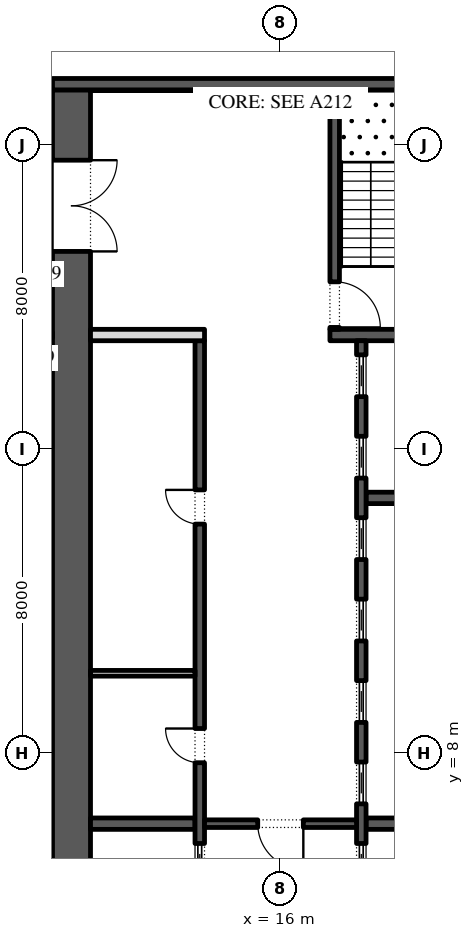
"""IFC4 building model, lengths in metres.
Left out: names, types, materials, properties, quantities, classifications, styles, units other than length and angle.
Written with IfcOpenShell. Run it as: python <this file> out.ifc"""

import sys

from ifc_helpers import new_model, si_unit, direction, frame, frame_2d, origin, place, context, subcontext, project, spatial, rectangle, extrude, element, fill, save


model = new_model("IFC4")
c1 = context("Model", 3, precision=1e-05, world=origin(), true_north=direction((0.0, 1.0)))
c2 = subcontext(c1, "Body", "Model", "MODEL_VIEW")
j1 = project(units=[si_unit("LENGTHUNIT", "METRE"), si_unit("PLANEANGLEUNIT", "RADIAN")], contexts=[c1])
p1 = place(None, origin())
s1 = spatial("IfcSite", under=j1, at=p1, CompositionType="ELEMENT")
p2 = place(p1, origin())
s2 = spatial("IfcBuilding", under=s1, at=p2, CompositionType="ELEMENT")
p3 = place(p2, frame((0.0, 0.0, 48.0)))
s3 = spatial("IfcBuildingStorey", under=s2, at=p3, CompositionType="ELEMENT", Elevation=48.0)
p4 = place(p3, frame((10.5, -2.45, 0.0), z_axis=(0.0, 0.0, 1.0), x_axis=(0.0, 1.0, 0.0)))
e1 = element("IfcWall", 1, at=p4, inside=s3, PredefinedType="SHEAR", context=c2, shape_type="SweptSolid", body=[
    extrude(rectangle(XDim=27.9, YDim=1.0, at=frame_2d((13.95, 0.0))), origin(), (0.0, 0.0, 1.0), 4.0),
])
p5 = place(p4, frame((23.65, 0.0, 0.0)))
e2 = element("IfcOpeningElement", 2, at=p5, cuts=e1, PredefinedType="OPENING", context=c2, shape_type="SweptSolid", body=[
    extrude(rectangle(XDim=2.4, YDim=2.1, at=frame_2d((1.2, 1.05))), frame((0.0, 0.51, 0.0), z_axis=(0.0, -1.0, 0.0), x_axis=(1.0, 0.0, 0.0)), (0.0, 0.0, 1.0), 1.02),
])
p6 = place(p4, frame((2.7, 0.0, 0.0)))
e3 = element("IfcOpeningElement", 3, at=p6, cuts=e1, PredefinedType="OPENING", context=c2, shape_type="SweptSolid", body=[
    extrude(rectangle(XDim=0.9, YDim=2.1, at=frame_2d((0.45, 1.05))), frame((0.0, 0.51, 0.0), z_axis=(0.0, -1.0, 0.0), x_axis=(1.0, 0.0, 0.0)), (0.0, 0.0, 1.0), 1.02),
])
p7 = place(p3, frame((10.0, 25.6, 0.0), z_axis=(0.0, 0.0, 1.0), x_axis=(1.0, 0.0, 0.0)))
e4 = element("IfcWall", 4, at=p7, inside=s3, PredefinedType="SHEAR", context=c2, shape_type="SweptSolid", body=[
    extrude(rectangle(XDim=12.0, YDim=0.3, at=frame_2d((6.0, 0.0))), origin(), (0.0, 0.0, 1.0), 4.0),
])
p8 = place(p3, frame((17.3, 19.0, 0.0), z_axis=(0.0, 0.0, 1.0), x_axis=(1.0, 0.0, 0.0)))
e5 = element("IfcWall", 5, at=p8, inside=s3, PredefinedType="SHEAR", context=c2, shape_type="SweptSolid", body=[
    extrude(rectangle(XDim=3.7, YDim=0.3, at=frame_2d((1.85, 0.0))), origin(), (0.0, 0.0, 1.0), 4.0),
])
p9 = place(p3, frame((17.425, 19.15, 0.0), z_axis=(0.0, 0.0, 1.0), x_axis=(0.0, 1.0, 0.0)))
e6 = element("IfcWall", 6, at=p9, inside=s3, PredefinedType="SHEAR", context=c2, shape_type="SweptSolid", body=[
    extrude(rectangle(XDim=6.3, YDim=0.25, at=frame_2d((3.15, 0.0))), origin(), (0.0, 0.0, 1.0), 4.0),
])
p10 = place(p9, frame((0.05, 0.0, 0.0)))
e7 = element("IfcOpeningElement", 7, at=p10, cuts=e6, PredefinedType="OPENING", context=c2, shape_type="SweptSolid", body=[
    extrude(rectangle(XDim=1.2, YDim=2.1, at=frame_2d((0.6, 1.05))), frame((0.0, 0.135, 0.0), z_axis=(0.0, -1.0, 0.0), x_axis=(1.0, 0.0, 0.0)), (0.0, 0.0, 1.0), 0.27),
])
for number, where, z_axis, x_axis in (
    (8, (18.25, 6.143, 0.0), (0.0, 0.0, 1.0), (1.0, 0.0, 0.0)),
    (9, (18.25, 14.714, 0.0), (0.0, 0.0, 1.0), (1.0, 0.0, 0.0)),
):
    element("IfcWall", number, at=place(p3, frame(where, z_axis=z_axis, x_axis=x_axis)), inside=s3, PredefinedType="SHEAR", context=c2, shape_type="SweptSolid", body=[
        extrude(rectangle(XDim=2.75, YDim=0.3, at=frame_2d((1.375, 0.0))), origin(), (0.0, 0.0, 1.0), 4.0),
    ])
p11 = place(p3, frame((18.125, 4.15, 0.0), z_axis=(0.0, 0.0, 1.0), x_axis=(0.0, 1.0, 0.0)))
e10 = element("IfcWall", 10, at=p11, inside=s3, PredefinedType="SHEAR", context=c2, shape_type="SweptSolid", body=[
    extrude(rectangle(XDim=14.7, YDim=0.25, at=frame_2d((7.35, 0.0))), origin(), (0.0, 0.0, 1.0), 4.0),
])
p12 = place(p11, frame((0.371, 0.0, 0.0)))
e11 = element("IfcOpeningElement", 11, at=p12, cuts=e10, PredefinedType="OPENING", context=c2, shape_type="SweptSolid", body=[
    extrude(rectangle(XDim=1.1, YDim=2.1, at=frame_2d((0.55, 1.05))), frame((0.0, 0.135, 0.0), z_axis=(0.0, -1.0, 0.0), x_axis=(1.0, 0.0, 0.0)), (0.0, 0.0, 1.0), 0.27),
])
p13 = place(p11, frame((2.514, 0.0, 0.0)))
e12 = element("IfcOpeningElement", 12, at=p13, cuts=e10, PredefinedType="OPENING", context=c2, shape_type="SweptSolid", body=[
    extrude(rectangle(XDim=1.1, YDim=2.1, at=frame_2d((0.55, 1.05))), frame((0.0, 0.135, 0.0), z_axis=(0.0, -1.0, 0.0), x_axis=(1.0, 0.0, 0.0)), (0.0, 0.0, 1.0), 0.27),
])
p14 = place(p11, frame((4.657, 0.0, 0.0)))
e13 = element("IfcOpeningElement", 13, at=p14, cuts=e10, PredefinedType="OPENING", context=c2, shape_type="SweptSolid", body=[
    extrude(rectangle(XDim=1.1, YDim=2.1, at=frame_2d((0.55, 1.05))), frame((0.0, 0.135, 0.0), z_axis=(0.0, -1.0, 0.0), x_axis=(1.0, 0.0, 0.0)), (0.0, 0.0, 1.0), 0.27),
])
p15 = place(p11, frame((6.8, 0.0, 0.0)))
e14 = element("IfcOpeningElement", 14, at=p15, cuts=e10, PredefinedType="OPENING", context=c2, shape_type="SweptSolid", body=[
    extrude(rectangle(XDim=1.1, YDim=2.1, at=frame_2d((0.55, 1.05))), frame((0.0, 0.135, 0.0), z_axis=(0.0, -1.0, 0.0), x_axis=(1.0, 0.0, 0.0)), (0.0, 0.0, 1.0), 0.27),
])
p16 = place(p11, frame((8.943, 0.0, 0.0)))
e15 = element("IfcOpeningElement", 15, at=p16, cuts=e10, PredefinedType="OPENING", context=c2, shape_type="SweptSolid", body=[
    extrude(rectangle(XDim=1.1, YDim=2.1, at=frame_2d((0.55, 1.05))), frame((0.0, 0.135, 0.0), z_axis=(0.0, -1.0, 0.0), x_axis=(1.0, 0.0, 0.0)), (0.0, 0.0, 1.0), 0.27),
])
p17 = place(p11, frame((11.086, 0.0, 0.0)))
e16 = element("IfcOpeningElement", 16, at=p17, cuts=e10, PredefinedType="OPENING", context=c2, shape_type="SweptSolid", body=[
    extrude(rectangle(XDim=1.1, YDim=2.1, at=frame_2d((0.55, 1.05))), frame((0.0, 0.135, 0.0), z_axis=(0.0, -1.0, 0.0), x_axis=(1.0, 0.0, 0.0)), (0.0, 0.0, 1.0), 0.27),
])
p18 = place(p11, frame((13.229, 0.0, 0.0)))
e17 = element("IfcOpeningElement", 17, at=p18, cuts=e10, PredefinedType="OPENING", context=c2, shape_type="SweptSolid", body=[
    extrude(rectangle(XDim=1.1, YDim=2.1, at=frame_2d((0.55, 1.05))), frame((0.0, 0.135, 0.0), z_axis=(0.0, -1.0, 0.0), x_axis=(1.0, 0.0, 0.0)), (0.0, 0.0, 1.0), 0.27),
])
p19 = place(p3, frame((11.0, 6.143, 0.0), z_axis=(0.0, 0.0, 1.0), x_axis=(1.0, 0.0, 0.0)))
e18 = element("IfcWall", 18, at=p19, inside=s3, PredefinedType="SHEAR", context=c2, shape_type="SweptSolid", body=[
    extrude(rectangle(XDim=2.75, YDim=0.3, at=frame_2d((1.375, 0.0))), origin(), (0.0, 0.0, 1.0), 4.0),
])
p20 = place(p3, frame((13.875, -2.45, 0.0), z_axis=(0.0, 0.0, 1.0), x_axis=(0.0, 1.0, 0.0)))
e19 = element("IfcWall", 19, at=p20, inside=s3, PredefinedType="SHEAR", context=c2, shape_type="SweptSolid", body=[
    extrude(rectangle(XDim=21.3, YDim=0.25, at=frame_2d((10.65, 0.0))), origin(), (0.0, 0.0, 1.0), 4.0),
])
p21 = place(p20, frame((10.196, 0.0, 0.0)))
e20 = element("IfcOpeningElement", 20, at=p21, cuts=e19, PredefinedType="OPENING", context=c2, shape_type="SweptSolid", body=[
    extrude(rectangle(XDim=0.9, YDim=2.1, at=frame_2d((0.45, 1.05))), frame((0.0, 0.135, 0.0), z_axis=(0.0, -1.0, 0.0), x_axis=(1.0, 0.0, 0.0)), (0.0, 0.0, 1.0), 0.27),
])
p22 = place(p20, frame((16.475, 0.0, 0.0)))
e21 = element("IfcOpeningElement", 21, at=p22, cuts=e19, PredefinedType="OPENING", context=c2, shape_type="SweptSolid", body=[
    extrude(rectangle(XDim=0.9, YDim=2.1, at=frame_2d((0.45, 1.05))), frame((0.0, 0.135, 0.0), z_axis=(0.0, -1.0, 0.0), x_axis=(1.0, 0.0, 0.0)), (0.0, 0.0, 1.0), 0.27),
])
p23 = place(p20, frame((6.971, 0.0, 0.0)))
e22 = element("IfcOpeningElement", 22, at=p23, cuts=e19, PredefinedType="OPENING", context=c2, shape_type="SweptSolid", body=[
    extrude(rectangle(XDim=1.1, YDim=2.1, at=frame_2d((0.55, 1.05))), frame((0.0, 0.135, 0.0), z_axis=(0.0, -1.0, 0.0), x_axis=(1.0, 0.0, 0.0)), (0.0, 0.0, 1.0), 0.27),
])
p24 = place(p3, frame((11.0, 19.0, 0.0), z_axis=(0.0, 0.0, 1.0), x_axis=(1.0, 0.0, 0.0)))
e23 = element("IfcWall", 23, at=p24, inside=s3, PredefinedType="PARTITIONING", context=c2, shape_type="SweptSolid", body=[
    extrude(rectangle(XDim=3.0, YDim=0.3, at=frame_2d((1.5, 0.0))), origin(), (0.0, 0.0, 1.0), 4.0),
])
p25 = place(p3, frame((11.0, 10.1, 0.0), z_axis=(0.0, 0.0, 1.0), x_axis=(1.0, 0.0, 0.0)))
e24 = element("IfcWall", 24, at=p25, inside=s3, PredefinedType="PARTITIONING", context=c2, shape_type="SweptSolid", body=[
    extrude(rectangle(XDim=2.75, YDim=0.15, at=frame_2d((1.375, 0.0))), origin(), (0.0, 0.0, 1.0), 4.0),
])
p26 = place(p3, frame((14.0, 6.143, 0.0), z_axis=(0.0, 0.0, 1.0), x_axis=(1.0, 0.0, 0.0)))
e25 = element("IfcWall", 25, at=p26, inside=s3, PredefinedType="SHEAR", context=c2, shape_type="SweptSolid", body=[
    extrude(rectangle(XDim=4.0, YDim=0.2, at=frame_2d((2.0, 0.0))), origin(), (0.0, 0.0, 1.0), 4.0),
])
p27 = place(p26, frame((1.4, 0.0, 0.0)))
e26 = element("IfcOpeningElement", 26, at=p27, cuts=e25, PredefinedType="OPENING", context=c2, shape_type="SweptSolid", body=[
    extrude(rectangle(XDim=1.2, YDim=2.1, at=frame_2d((0.6, 1.05))), frame((0.0, 0.11, 0.0), z_axis=(0.0, -1.0, 0.0), x_axis=(1.0, 0.0, 0.0)), (0.0, 0.0, 1.0), 0.22),
])
p28 = place(p12, origin())
e27 = element("IfcDoor", 27, at=p28, inside=s3, OperationType="SLIDING_TO_LEFT", PredefinedType="DOOR", context=c2, shape_type="SweptSolid", body=[
    extrude(rectangle(XDim=1.1, YDim=2.1, at=frame_2d((0.55, 1.05))), frame((0.0, 0.025, 0.0), z_axis=(0.0, -1.0, 0.0), x_axis=(1.0, 0.0, 0.0)), (0.0, 0.0, 1.0), 0.05),
])
fill(e11, e27)
p29 = place(p13, origin())
e28 = element("IfcDoor", 28, at=p29, inside=s3, OperationType="SLIDING_TO_LEFT", PredefinedType="DOOR", context=c2, shape_type="SweptSolid", body=[
    extrude(rectangle(XDim=1.1, YDim=2.1, at=frame_2d((0.55, 1.05))), frame((0.0, 0.025, 0.0), z_axis=(0.0, -1.0, 0.0), x_axis=(1.0, 0.0, 0.0)), (0.0, 0.0, 1.0), 0.05),
])
fill(e12, e28)
p30 = place(p14, origin())
e29 = element("IfcDoor", 29, at=p30, inside=s3, OperationType="SLIDING_TO_LEFT", PredefinedType="DOOR", context=c2, shape_type="SweptSolid", body=[
    extrude(rectangle(XDim=1.1, YDim=2.1, at=frame_2d((0.55, 1.05))), frame((0.0, 0.025, 0.0), z_axis=(0.0, -1.0, 0.0), x_axis=(1.0, 0.0, 0.0)), (0.0, 0.0, 1.0), 0.05),
])
fill(e13, e29)
p31 = place(p15, origin())
e30 = element("IfcDoor", 30, at=p31, inside=s3, OperationType="SLIDING_TO_LEFT", PredefinedType="DOOR", context=c2, shape_type="SweptSolid", body=[
    extrude(rectangle(XDim=1.1, YDim=2.1, at=frame_2d((0.55, 1.05))), frame((0.0, 0.025, 0.0), z_axis=(0.0, -1.0, 0.0), x_axis=(1.0, 0.0, 0.0)), (0.0, 0.0, 1.0), 0.05),
])
fill(e14, e30)
p32 = place(p16, origin())
e31 = element("IfcDoor", 31, at=p32, inside=s3, OperationType="SLIDING_TO_LEFT", PredefinedType="DOOR", context=c2, shape_type="SweptSolid", body=[
    extrude(rectangle(XDim=1.1, YDim=2.1, at=frame_2d((0.55, 1.05))), frame((0.0, 0.025, 0.0), z_axis=(0.0, -1.0, 0.0), x_axis=(1.0, 0.0, 0.0)), (0.0, 0.0, 1.0), 0.05),
])
fill(e15, e31)
p33 = place(p17, origin())
e32 = element("IfcDoor", 32, at=p33, inside=s3, OperationType="SLIDING_TO_LEFT", PredefinedType="DOOR", context=c2, shape_type="SweptSolid", body=[
    extrude(rectangle(XDim=1.1, YDim=2.1, at=frame_2d((0.55, 1.05))), frame((0.0, 0.025, 0.0), z_axis=(0.0, -1.0, 0.0), x_axis=(1.0, 0.0, 0.0)), (0.0, 0.0, 1.0), 0.05),
])
fill(e16, e32)
p34 = place(p18, origin())
e33 = element("IfcDoor", 33, at=p34, inside=s3, OperationType="SLIDING_TO_LEFT", PredefinedType="DOOR", context=c2, shape_type="SweptSolid", body=[
    extrude(rectangle(XDim=1.1, YDim=2.1, at=frame_2d((0.55, 1.05))), frame((0.0, 0.025, 0.0), z_axis=(0.0, -1.0, 0.0), x_axis=(1.0, 0.0, 0.0)), (0.0, 0.0, 1.0), 0.05),
])
fill(e17, e33)
p35 = place(p21, origin())
e34 = element("IfcDoor", 34, at=p35, inside=s3, OperationType="SINGLE_SWING_LEFT", PredefinedType="DOOR", context=c2, shape_type="SweptSolid", body=[
    extrude(rectangle(XDim=0.9, YDim=2.1, at=frame_2d((0.45, 1.05))), frame((0.0, 0.125, 0.0), z_axis=(0.0, -1.0, 0.0), x_axis=(1.0, 0.0, 0.0)), (0.0, 0.0, 1.0), 0.05),
])
fill(e20, e34)
p36 = place(p22, origin())
e35 = element("IfcDoor", 35, at=p36, inside=s3, OperationType="SINGLE_SWING_LEFT", PredefinedType="DOOR", context=c2, shape_type="SweptSolid", body=[
    extrude(rectangle(XDim=0.9, YDim=2.1, at=frame_2d((0.45, 1.05))), frame((0.0, 0.125, 0.0), z_axis=(0.0, -1.0, 0.0), x_axis=(1.0, 0.0, 0.0)), (0.0, 0.0, 1.0), 0.05),
])
fill(e21, e35)
p37 = place(p23, origin())
e36 = element("IfcDoor", 36, at=p37, inside=s3, OperationType="SLIDING_TO_LEFT", PredefinedType="DOOR", context=c2, shape_type="SweptSolid", body=[
    extrude(rectangle(XDim=1.1, YDim=2.1, at=frame_2d((0.55, 1.05))), frame((0.0, 0.025, 0.0), z_axis=(0.0, -1.0, 0.0), x_axis=(1.0, 0.0, 0.0)), (0.0, 0.0, 1.0), 0.05),
])
fill(e22, e36)
p38 = place(p27, frame((1.2, 0.0, 0.0), z_axis=(0.0, 0.0, 1.0), x_axis=(-1.0, 0.0, 0.0)))
e37 = element("IfcDoor", 37, at=p38, inside=s3, OperationType="SINGLE_SWING_RIGHT", PredefinedType="DOOR", context=c2, shape_type="SweptSolid", body=[
    extrude(rectangle(XDim=1.2, YDim=2.1, at=frame_2d((0.6, 1.05))), frame((0.0, 0.025, 0.0), z_axis=(0.0, -1.0, 0.0), x_axis=(1.0, 0.0, 0.0)), (0.0, 0.0, 1.0), 0.05),
])
fill(e26, e37)
p39 = place(p5, frame((2.4, 0.0, 0.0), z_axis=(0.0, 0.0, 1.0), x_axis=(-1.0, 0.0, 0.0)))
e38 = element("IfcDoor", 38, at=p39, inside=s3, OperationType="DOUBLE_DOOR_SINGLE_SWING", PredefinedType="DOOR", context=c2, shape_type="SweptSolid", body=[
    extrude(rectangle(XDim=2.4, YDim=2.1, at=frame_2d((1.2, 1.05))), frame((0.0, 0.025, 0.0), z_axis=(0.0, -1.0, 0.0), x_axis=(1.0, 0.0, 0.0)), (0.0, 0.0, 1.0), 0.05),
])
fill(e2, e38)
p40 = place(p10, frame((1.2, 0.0, 0.0), z_axis=(0.0, 0.0, 1.0), x_axis=(-1.0, 0.0, 0.0)))
e39 = element("IfcDoor", 39, at=p40, inside=s3, OperationType="SINGLE_SWING_LEFT", PredefinedType="DOOR", context=c2, shape_type="SweptSolid", body=[
    extrude(rectangle(XDim=1.2, YDim=2.1, at=frame_2d((0.6, 1.05))), frame((0.0, 0.025, 0.0), z_axis=(0.0, -1.0, 0.0), x_axis=(1.0, 0.0, 0.0)), (0.0, 0.0, 1.0), 0.05),
])
fill(e7, e39)
save(model, sys.argv[1])
